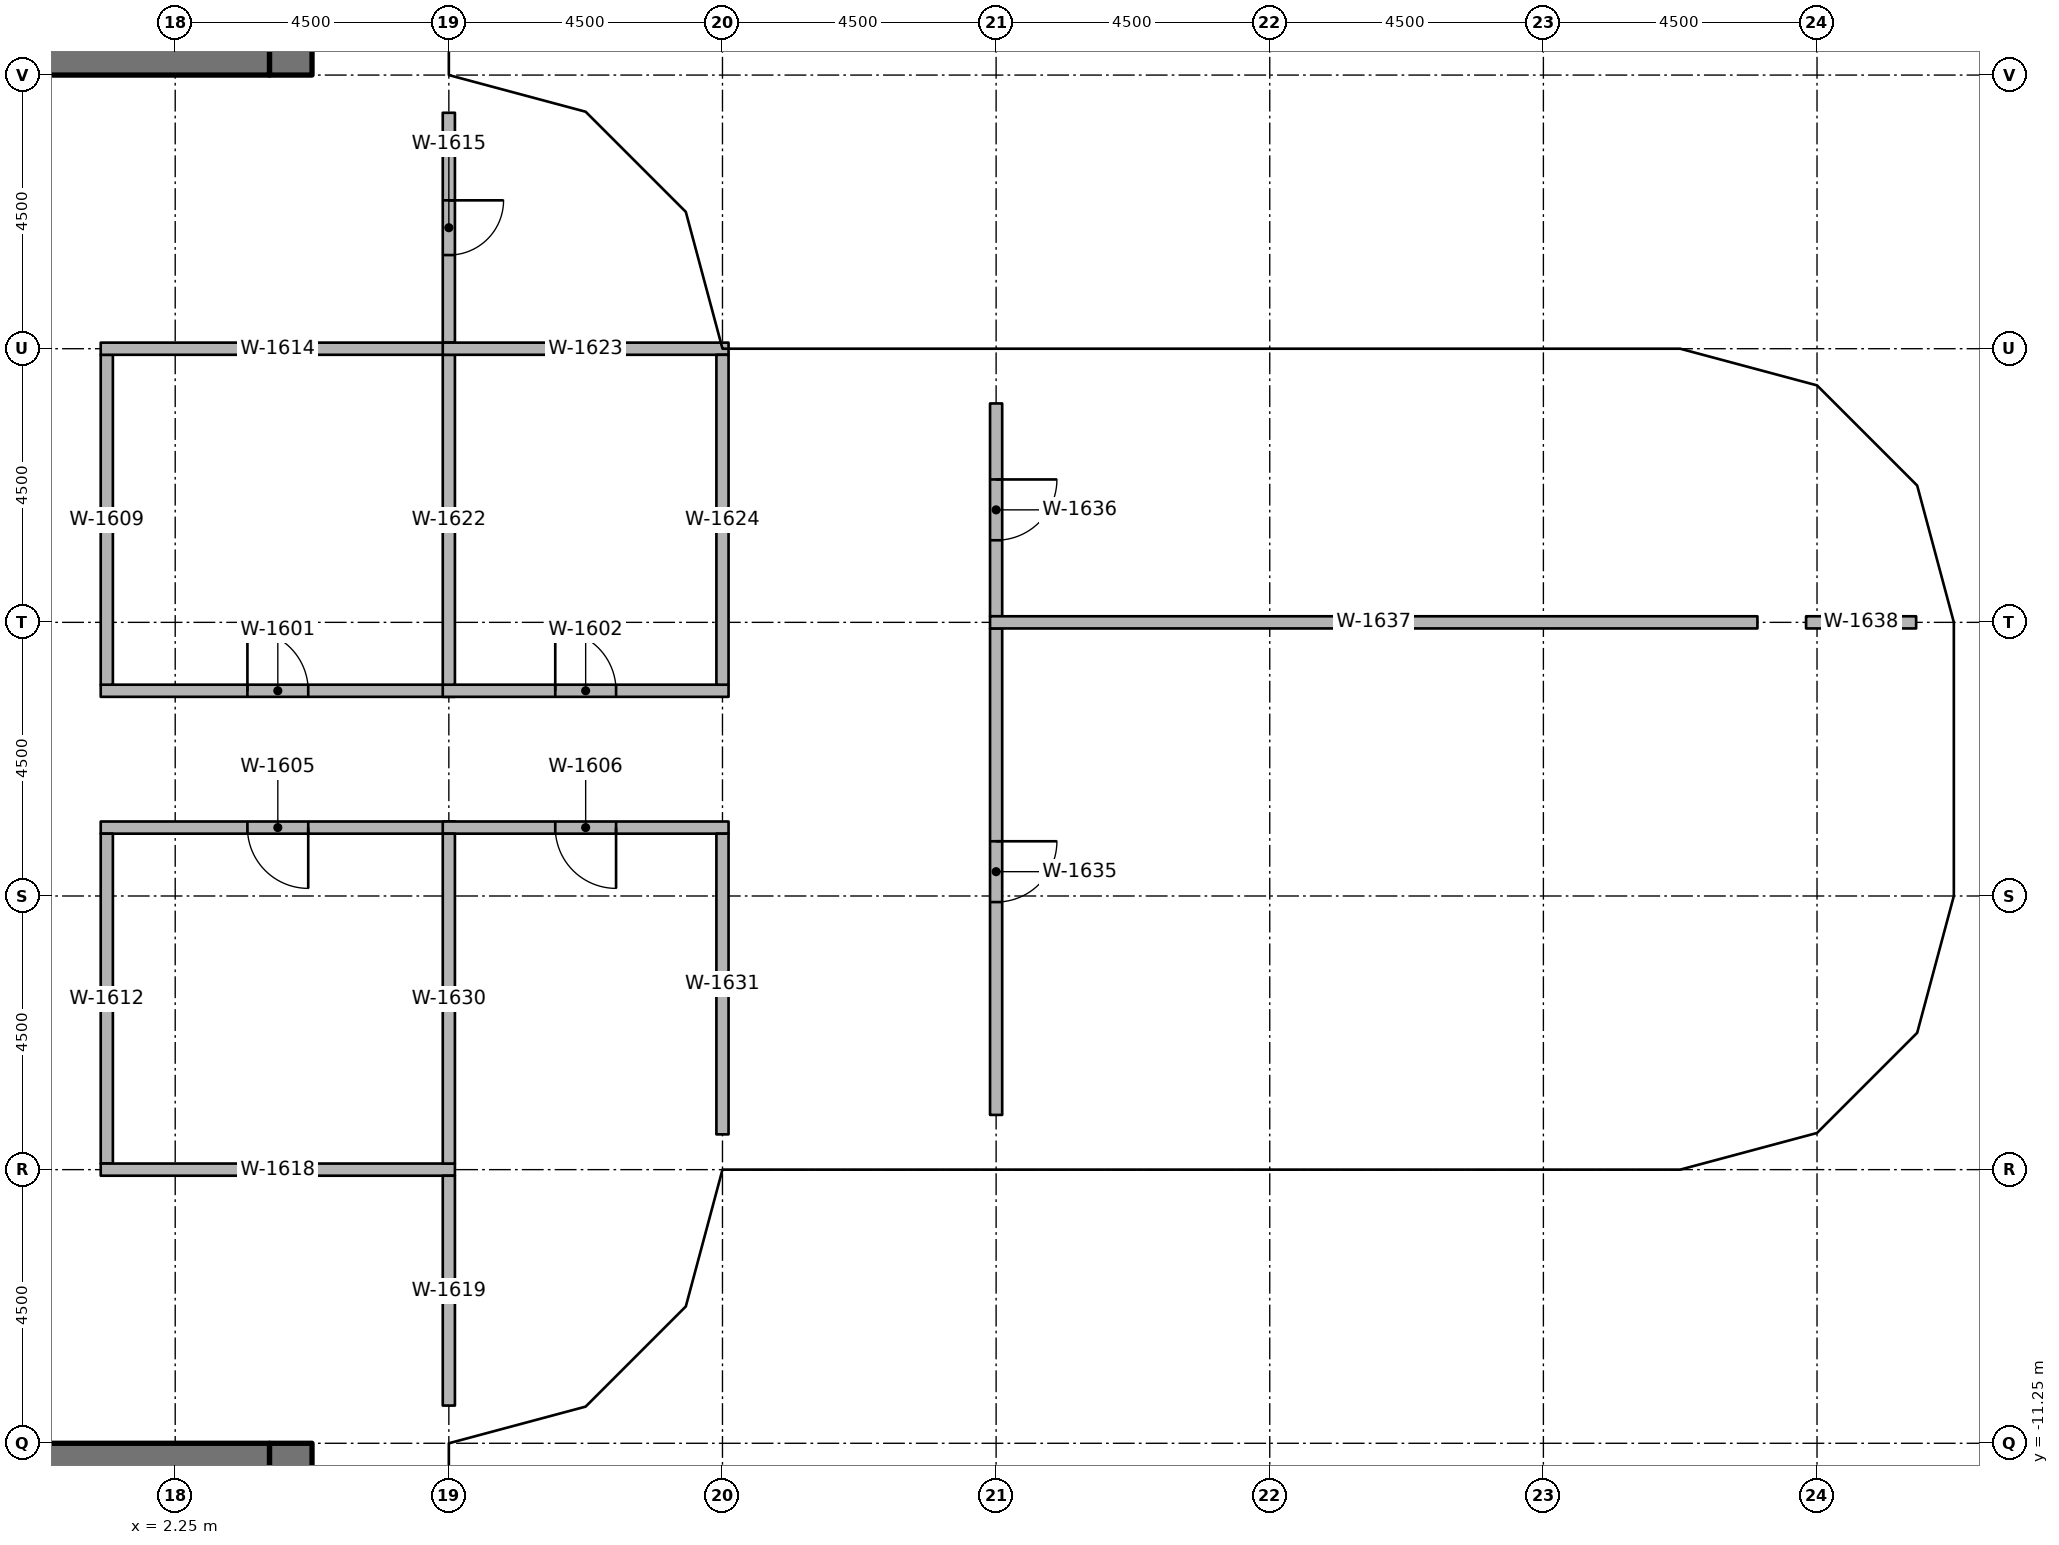
"""IFC4 building model, lengths in metres.
Left out: names, types, materials, properties, quantities, classifications, styles, units other than length and angle.
Written with IfcOpenShell. Run it as: python <this file> out.ifc"""

import sys

from ifc_helpers import new_model, si_unit, direction, frame, frame_2d, origin, origin_2d, place, context, subcontext, project, spatial, rectangle, extrude, element, fill, save


model = new_model("IFC4")
c1 = context("Model", 3, precision=1e-05, world=origin(), true_north=direction((0.0, 1.0)))
c2 = subcontext(c1, "Body", "Model", "MODEL_VIEW")
j1 = project(units=[si_unit("LENGTHUNIT", "METRE"), si_unit("PLANEANGLEUNIT", "RADIAN")], contexts=[c1])
p1 = place(None, origin())
s1 = spatial("IfcSite", under=j1, at=p1, CompositionType="ELEMENT")
p2 = place(p1, origin())
s2 = spatial("IfcBuilding", under=s1, at=p2, CompositionType="ELEMENT")
p3 = place(p2, frame((0.0, 0.0, 156.2)))
s3 = spatial("IfcBuildingStorey", under=s2, at=p3, CompositionType="ELEMENT", Elevation=156.2)
for number, where, z_axis, x_axis in (
    (1, (6.25, -10.75, 0.0), (0.0, 0.0, 1.0), (1.0, 0.0, 0.0)),
    (2, (6.25, -6.25, 0.0), (0.0, 0.0, 1.0), (1.0, 0.0, 0.0)),
    (3, (6.25, 6.25, 0.0), (0.0, 0.0, 1.0), (1.0, 0.0, 0.0)),
    (4, (6.25, 10.75, 0.0), (0.0, 0.0, 1.0), (1.0, 0.0, 0.0)),
    (5, (10.75, -6.25, 0.0), (0.0, 0.0, 1.0), (1.0, 0.0, 0.0)),
    (6, (10.75, 6.25, 0.0), (0.0, 0.0, 1.0), (1.0, 0.0, 0.0)),
    (7, (15.75, -6.25, 0.0), (0.0, 0.0, 1.0), (1.0, 0.0, 0.0)),
    (8, (15.75, 6.25, 0.0), (0.0, 0.0, 1.0), (1.0, 0.0, 0.0)),
    (9, (20.25, -6.11, 0.0), (0.0, 0.0, 1.0), (1.0, 0.0, 0.0)),
    (10, (20.25, 6.11, 0.0), (0.0, 0.0, 1.0), (1.0, 0.0, 0.0)),
    (11, (24.75, -6.11, 0.0), (0.0, 0.0, 1.0), (1.0, 0.0, 0.0)),
    (12, (24.75, 6.11, 0.0), (0.0, 0.0, 1.0), (1.0, 0.0, 0.0)),
    (13, (28.908, -5.475, 0.0), (0.0, 0.0, 1.0), (1.0, 0.0, 0.0)),
    (14, (28.67, -2.25, 0.0), (0.0, 0.0, 1.0), (1.0, 0.0, 0.0)),
    (15, (28.67, 2.25, 0.0), (0.0, 0.0, 1.0), (1.0, 0.0, 0.0)),
    (16, (28.908, 5.475, 0.0), (0.0, 0.0, 1.0), (1.0, 0.0, 0.0)),
):
    element("IfcColumn", number, at=place(p3, frame(where, z_axis=z_axis, x_axis=x_axis)), inside=s3, PredefinedType="COLUMN", context=c2, shape_type="SweptSolid", body=[
        extrude(rectangle(XDim=0.8, YDim=0.8, at=origin_2d()), origin(), (0.0, 0.0, 1.0), 3.65),
    ])
p4 = place(p3, frame((4.15, 11.25, 0.0), z_axis=(0.0, 0.0, 1.0), x_axis=(0.0, 1.0, 0.0)))
e17 = element("IfcWall", 17, at=p4, inside=s3, PredefinedType="SHEAR", context=c2, shape_type="SweptSolid", body=[
    extrude(rectangle(XDim=15.0, YDim=0.7, at=frame_2d((7.5, 0.0))), origin(), (0.0, 0.0, 1.0), 3.8),
])
p5 = place(p4, frame((7.15, 0.0, 0.0)))
e18 = element("IfcOpeningElement", 18, at=p5, cuts=e17, PredefinedType="OPENING", context=c2, shape_type="SweptSolid", body=[
    extrude(rectangle(XDim=1.5, YDim=2.3, at=frame_2d((0.75, 1.15))), frame((0.0, 0.36, 0.0), z_axis=(0.0, -1.0, 0.0), x_axis=(1.0, 0.0, 0.0)), (0.0, 0.0, 1.0), 0.72),
])
p6 = place(p4, frame((5.55, 0.0, 0.0)))
e19 = element("IfcOpeningElement", 19, at=p6, cuts=e17, PredefinedType="OPENING", context=c2, shape_type="SweptSolid", body=[
    extrude(rectangle(XDim=1.2, YDim=2.1, at=frame_2d((0.6, 1.05))), frame((0.0, 0.36, 0.0), z_axis=(0.0, -1.0, 0.0), x_axis=(1.0, 0.0, 0.0)), (0.0, 0.0, 1.0), 0.72),
])
p7 = place(p3, frame((-3.8, 11.6, 0.0), z_axis=(0.0, 0.0, 1.0), x_axis=(1.0, 0.0, 0.0)))
e20 = element("IfcWall", 20, at=p7, inside=s3, PredefinedType="SHEAR", context=c2, shape_type="SweptSolid", body=[
    extrude(rectangle(XDim=7.6, YDim=0.7, at=frame_2d((3.8, 0.0))), origin(), (0.0, 0.0, 1.0), 3.8),
])
p8 = place(p3, frame((4.15, -11.25, 0.0), z_axis=(0.0, 0.0, 1.0), x_axis=(0.0, -1.0, 0.0)))
e21 = element("IfcWall", 21, at=p8, inside=s3, PredefinedType="SHEAR", context=c2, shape_type="SweptSolid", body=[
    extrude(rectangle(XDim=15.0, YDim=0.7, at=frame_2d((7.5, 0.0))), origin(), (0.0, 0.0, 1.0), 3.8),
])
p9 = place(p8, frame((7.15, 0.0, 0.0)))
e22 = element("IfcOpeningElement", 22, at=p9, cuts=e21, PredefinedType="OPENING", context=c2, shape_type="SweptSolid", body=[
    extrude(rectangle(XDim=1.5, YDim=2.3, at=frame_2d((0.75, 1.15))), frame((0.0, 0.36, 0.0), z_axis=(0.0, -1.0, 0.0), x_axis=(1.0, 0.0, 0.0)), (0.0, 0.0, 1.0), 0.72),
])
p10 = place(p8, frame((13.9, 0.0, 0.0)))
e23 = element("IfcOpeningElement", 23, at=p10, cuts=e21, PredefinedType="OPENING", context=c2, shape_type="SweptSolid", body=[
    extrude(rectangle(XDim=0.9, YDim=2.1, at=frame_2d((0.45, 1.05))), frame((0.0, 0.36, 0.0), z_axis=(0.0, -1.0, 0.0), x_axis=(1.0, 0.0, 0.0)), (0.0, 0.0, 1.0), 0.72),
])
p11 = place(p8, frame((1.15, 0.0, 0.0)))
e24 = element("IfcOpeningElement", 24, at=p11, cuts=e21, PredefinedType="OPENING", context=c2, shape_type="SweptSolid", body=[
    extrude(rectangle(XDim=1.2, YDim=2.1, at=frame_2d((0.6, 1.05))), frame((0.0, 0.36, 0.0), z_axis=(0.0, -1.0, 0.0), x_axis=(1.0, 0.0, 0.0)), (0.0, 0.0, 1.0), 0.72),
])
p12 = place(p3, frame((-3.8, -11.6, 0.0), z_axis=(0.0, 0.0, 1.0), x_axis=(1.0, 0.0, 0.0)))
e25 = element("IfcWall", 25, at=p12, inside=s3, PredefinedType="SHEAR", context=c2, shape_type="SweptSolid", body=[
    extrude(rectangle(XDim=7.6, YDim=0.7, at=frame_2d((3.8, 0.0))), origin(), (0.0, 0.0, 1.0), 3.8),
])
p13 = place(p3, frame((1.025, 1.125, 0.0), z_axis=(0.0, 0.0, 1.0), x_axis=(1.0, 0.0, 0.0)))
e26 = element("IfcWall", 26, at=p13, inside=s3, PredefinedType="PARTITIONING", context=c2, shape_type="SweptSolid", body=[
    extrude(rectangle(XDim=5.825, YDim=0.2, at=frame_2d((2.913, 0.0))), origin(), (0.0, 0.0, 1.0), 2.75),
])
p14 = place(p13, frame((2.413, 0.0, 0.0)))
e27 = element("IfcOpeningElement", 27, at=p14, cuts=e26, PredefinedType="OPENING", context=c2, shape_type="SweptSolid", body=[
    extrude(rectangle(XDim=1.0, YDim=2.1, at=frame_2d((0.5, 1.05))), frame((0.0, 0.11, 0.0), z_axis=(0.0, -1.0, 0.0), x_axis=(1.0, 0.0, 0.0)), (0.0, 0.0, 1.0), 0.22),
])
p15 = place(p3, frame((6.65, 1.125, 0.0), z_axis=(0.0, 0.0, 1.0), x_axis=(1.0, 0.0, 0.0)))
e28 = element("IfcWall", 28, at=p15, inside=s3, PredefinedType="PARTITIONING", context=c2, shape_type="SweptSolid", body=[
    extrude(rectangle(XDim=4.7, YDim=0.2, at=frame_2d((2.35, 0.0))), origin(), (0.0, 0.0, 1.0), 2.75),
])
p16 = place(p15, frame((1.85, 0.0, 0.0)))
e29 = element("IfcOpeningElement", 29, at=p16, cuts=e28, PredefinedType="OPENING", context=c2, shape_type="SweptSolid", body=[
    extrude(rectangle(XDim=1.0, YDim=2.1, at=frame_2d((0.5, 1.05))), frame((0.0, 0.11, 0.0), z_axis=(0.0, -1.0, 0.0), x_axis=(1.0, 0.0, 0.0)), (0.0, 0.0, 1.0), 0.22),
])
p17 = place(p3, frame((6.85, -1.125, 0.0), z_axis=(0.0, 0.0, 1.0), x_axis=(-1.0, 0.0, 0.0)))
e30 = element("IfcWall", 30, at=p17, inside=s3, PredefinedType="PARTITIONING", context=c2, shape_type="SweptSolid", body=[
    extrude(rectangle(XDim=5.825, YDim=0.2, at=frame_2d((2.913, 0.0))), origin(), (0.0, 0.0, 1.0), 2.75),
])
p18 = place(p17, frame((2.413, 0.0, 0.0)))
e31 = element("IfcOpeningElement", 31, at=p18, cuts=e30, PredefinedType="OPENING", context=c2, shape_type="SweptSolid", body=[
    extrude(rectangle(XDim=1.0, YDim=2.1, at=frame_2d((0.5, 1.05))), frame((0.0, 0.11, 0.0), z_axis=(0.0, -1.0, 0.0), x_axis=(1.0, 0.0, 0.0)), (0.0, 0.0, 1.0), 0.22),
])
p19 = place(p3, frame((11.35, -1.125, 0.0), z_axis=(0.0, 0.0, 1.0), x_axis=(-1.0, 0.0, 0.0)))
e32 = element("IfcWall", 32, at=p19, inside=s3, PredefinedType="PARTITIONING", context=c2, shape_type="SweptSolid", body=[
    extrude(rectangle(XDim=4.7, YDim=0.2, at=frame_2d((2.35, 0.0))), origin(), (0.0, 0.0, 1.0), 2.75),
])
p20 = place(p19, frame((1.85, 0.0, 0.0)))
e33 = element("IfcOpeningElement", 33, at=p20, cuts=e32, PredefinedType="OPENING", context=c2, shape_type="SweptSolid", body=[
    extrude(rectangle(XDim=1.0, YDim=2.1, at=frame_2d((0.5, 1.05))), frame((0.0, 0.11, 0.0), z_axis=(0.0, -1.0, 0.0), x_axis=(1.0, 0.0, 0.0)), (0.0, 0.0, 1.0), 0.22),
])
for number, where, z_axis, x_axis in (
    (34, (1.125, 1.225, 0.0), (0.0, 0.0, 1.0), (0.0, 1.0, 0.0)),
    (35, (1.125, -6.65, 0.0), (0.0, 0.0, 1.0), (0.0, 1.0, 0.0)),
):
    element("IfcWall", number, at=place(p3, frame(where, z_axis=z_axis, x_axis=x_axis)), inside=s3, PredefinedType="PARTITIONING", context=c2, shape_type="SweptSolid", body=[
        extrude(rectangle(XDim=5.425, YDim=0.2, at=frame_2d((2.712, 0.0))), origin(), (0.0, 0.0, 1.0), 2.75),
    ])
p21 = place(p3, frame((1.025, 6.75, 0.0), z_axis=(0.0, 0.0, 1.0), x_axis=(1.0, 0.0, 0.0)))
e36 = element("IfcWall", 36, at=p21, inside=s3, PredefinedType="PARTITIONING", context=c2, shape_type="SweptSolid", body=[
    extrude(rectangle(XDim=5.825, YDim=0.2, at=frame_2d((2.913, 0.0))), origin(), (0.0, 0.0, 1.0), 2.75),
])
p22 = place(p3, frame((6.75, 10.63, 0.0), z_axis=(0.0, 0.0, 1.0), x_axis=(0.0, -1.0, 0.0)))
e37 = element("IfcWall", 37, at=p22, inside=s3, PredefinedType="PARTITIONING", context=c2, shape_type="SweptSolid", body=[
    extrude(rectangle(XDim=3.78, YDim=0.2, at=frame_2d((1.89, 0.0))), origin(), (0.0, 0.0, 1.0), 2.75),
])
p23 = place(p22, frame((1.44, 0.0, 0.0)))
e38 = element("IfcOpeningElement", 38, at=p23, cuts=e37, PredefinedType="OPENING", context=c2, shape_type="SweptSolid", body=[
    extrude(rectangle(XDim=0.9, YDim=2.1, at=frame_2d((0.45, 1.05))), frame((0.0, 0.11, 0.0), z_axis=(0.0, -1.0, 0.0), x_axis=(1.0, 0.0, 0.0)), (0.0, 0.0, 1.0), 0.22),
])
p24 = place(p3, frame((1.025, -6.75, 0.0), z_axis=(0.0, 0.0, 1.0), x_axis=(1.0, 0.0, 0.0)))
e39 = element("IfcWall", 39, at=p24, inside=s3, PredefinedType="PARTITIONING", context=c2, shape_type="SweptSolid", body=[
    extrude(rectangle(XDim=5.825, YDim=0.2, at=frame_2d((2.913, 0.0))), origin(), (0.0, 0.0, 1.0), 2.75),
])
p25 = place(p3, frame((6.75, -10.63, 0.0), z_axis=(0.0, 0.0, 1.0), x_axis=(0.0, 1.0, 0.0)))
e40 = element("IfcWall", 40, at=p25, inside=s3, PredefinedType="PARTITIONING", context=c2, shape_type="SweptSolid", body=[
    extrude(rectangle(XDim=3.78, YDim=0.2, at=frame_2d((1.89, 0.0))), origin(), (0.0, 0.0, 1.0), 2.75),
])
p26 = place(p3, frame((6.75, 1.225, 0.0), z_axis=(0.0, 0.0, 1.0), x_axis=(0.0, 1.0, 0.0)))
e41 = element("IfcWall", 41, at=p26, inside=s3, PredefinedType="PARTITIONING", context=c2, shape_type="SweptSolid", body=[
    extrude(rectangle(XDim=5.425, YDim=0.2, at=frame_2d((2.712, 0.0))), origin(), (0.0, 0.0, 1.0), 2.75),
])
p27 = place(p3, frame((6.65, 6.75, 0.0), z_axis=(0.0, 0.0, 1.0), x_axis=(1.0, 0.0, 0.0)))
e42 = element("IfcWall", 42, at=p27, inside=s3, PredefinedType="PARTITIONING", context=c2, shape_type="SweptSolid", body=[
    extrude(rectangle(XDim=4.7, YDim=0.2, at=frame_2d((2.35, 0.0))), origin(), (0.0, 0.0, 1.0), 2.75),
])
for number, where, z_axis, x_axis in (
    (43, (11.25, 1.225, 0.0), (0.0, 0.0, 1.0), (0.0, 1.0, 0.0)),
    (44, (6.75, -6.65, 0.0), (0.0, 0.0, 1.0), (0.0, 1.0, 0.0)),
):
    element("IfcWall", number, at=place(p3, frame(where, z_axis=z_axis, x_axis=x_axis)), inside=s3, PredefinedType="PARTITIONING", context=c2, shape_type="SweptSolid", body=[
        extrude(rectangle(XDim=5.425, YDim=0.2, at=frame_2d((2.712, 0.0))), origin(), (0.0, 0.0, 1.0), 2.75),
    ])
p28 = place(p3, frame((11.25, -6.17, 0.0), z_axis=(0.0, 0.0, 1.0), x_axis=(0.0, 1.0, 0.0)))
e45 = element("IfcWall", 45, at=p28, inside=s3, PredefinedType="PARTITIONING", context=c2, shape_type="SweptSolid", body=[
    extrude(rectangle(XDim=4.945, YDim=0.2, at=frame_2d((2.472, 0.0))), origin(), (0.0, 0.0, 1.0), 2.75),
])
p29 = place(p3, frame((15.75, 2.15, 0.0), z_axis=(0.0, 0.0, 1.0), x_axis=(0.0, -1.0, 0.0)))
e46 = element("IfcWall", 46, at=p29, inside=s3, PredefinedType="PARTITIONING", context=c2, shape_type="SweptSolid", body=[
    extrude(rectangle(XDim=8.0, YDim=0.2, at=frame_2d((4.0, 0.0))), origin(), (0.0, 0.0, 1.0), 2.75),
])
p30 = place(p29, frame((3.5, 0.0, 0.0)))
e47 = element("IfcOpeningElement", 47, at=p30, cuts=e46, PredefinedType="OPENING", context=c2, shape_type="SweptSolid", body=[
    extrude(rectangle(XDim=1.0, YDim=2.1, at=frame_2d((0.5, 1.05))), frame((0.0, 0.11, 0.0), z_axis=(0.0, -1.0, 0.0), x_axis=(1.0, 0.0, 0.0)), (0.0, 0.0, 1.0), 0.22),
])
p31 = place(p3, frame((15.75, 5.85, 0.0), z_axis=(0.0, 0.0, 1.0), x_axis=(0.0, -1.0, 0.0)))
e48 = element("IfcWall", 48, at=p31, inside=s3, PredefinedType="PARTITIONING", context=c2, shape_type="SweptSolid", body=[
    extrude(rectangle(XDim=3.5, YDim=0.2, at=frame_2d((1.75, 0.0))), origin(), (0.0, 0.0, 1.0), 2.75),
])
p32 = place(p31, frame((1.25, 0.0, 0.0)))
e49 = element("IfcOpeningElement", 49, at=p32, cuts=e48, PredefinedType="OPENING", context=c2, shape_type="SweptSolid", body=[
    extrude(rectangle(XDim=1.0, YDim=2.1, at=frame_2d((0.5, 1.05))), frame((0.0, 0.11, 0.0), z_axis=(0.0, -1.0, 0.0), x_axis=(1.0, 0.0, 0.0)), (0.0, 0.0, 1.0), 0.22),
])
p33 = place(p3, frame((15.65, 2.25, 0.0), z_axis=(0.0, 0.0, 1.0), x_axis=(1.0, 0.0, 0.0)))
e50 = element("IfcWall", 50, at=p33, inside=s3, PredefinedType="PARTITIONING", context=c2, shape_type="SweptSolid", body=[
    extrude(rectangle(XDim=12.62, YDim=0.2, at=frame_2d((6.31, 0.0))), origin(), (0.0, 0.0, 1.0), 2.75),
])
p34 = place(p3, frame((29.07, 2.25, 0.0), z_axis=(0.0, 0.0, 1.0), x_axis=(1.0, 0.0, 0.0)))
e51 = element("IfcWall", 51, at=p34, inside=s3, PredefinedType="PARTITIONING", context=c2, shape_type="SweptSolid", body=[
    extrude(rectangle(XDim=1.81, YDim=0.2, at=frame_2d((0.905, 0.0))), origin(), (0.0, 0.0, 1.0), 2.75),
])
p35 = place(p30, origin())
e52 = element("IfcDoor", 52, at=p35, inside=s3, OperationType="SINGLE_SWING_RIGHT", PredefinedType="DOOR", context=c2, shape_type="SweptSolid", body=[
    extrude(rectangle(XDim=1.0, YDim=2.1, at=frame_2d((0.5, 1.05))), frame((0.0, 0.025, 0.0), z_axis=(0.0, -1.0, 0.0), x_axis=(1.0, 0.0, 0.0)), (0.0, 0.0, 1.0), 0.05),
])
fill(e47, e52)
p36 = place(p32, origin())
e53 = element("IfcDoor", 53, at=p36, inside=s3, OperationType="SINGLE_SWING_RIGHT", PredefinedType="DOOR", context=c2, shape_type="SweptSolid", body=[
    extrude(rectangle(XDim=1.0, YDim=2.1, at=frame_2d((0.5, 1.05))), frame((0.0, 0.025, 0.0), z_axis=(0.0, -1.0, 0.0), x_axis=(1.0, 0.0, 0.0)), (0.0, 0.0, 1.0), 0.05),
])
fill(e49, e53)
p37 = place(p14, origin())
e54 = element("IfcDoor", 54, at=p37, inside=s3, OperationType="SINGLE_SWING_RIGHT", PredefinedType="DOOR", context=c2, shape_type="SweptSolid", body=[
    extrude(rectangle(XDim=1.0, YDim=2.1, at=frame_2d((0.5, 1.05))), frame((0.0, 0.025, 0.0), z_axis=(0.0, -1.0, 0.0), x_axis=(1.0, 0.0, 0.0)), (0.0, 0.0, 1.0), 0.05),
])
fill(e27, e54)
p38 = place(p16, origin())
e55 = element("IfcDoor", 55, at=p38, inside=s3, OperationType="SINGLE_SWING_RIGHT", PredefinedType="DOOR", context=c2, shape_type="SweptSolid", body=[
    extrude(rectangle(XDim=1.0, YDim=2.1, at=frame_2d((0.5, 1.05))), frame((0.0, 0.025, 0.0), z_axis=(0.0, -1.0, 0.0), x_axis=(1.0, 0.0, 0.0)), (0.0, 0.0, 1.0), 0.05),
])
fill(e29, e55)
p39 = place(p23, origin())
e56 = element("IfcDoor", 56, at=p39, inside=s3, OperationType="SINGLE_SWING_RIGHT", PredefinedType="DOOR", context=c2, shape_type="SweptSolid", body=[
    extrude(rectangle(XDim=0.9, YDim=2.1, at=frame_2d((0.45, 1.05))), frame((0.0, 0.025, 0.0), z_axis=(0.0, -1.0, 0.0), x_axis=(1.0, 0.0, 0.0)), (0.0, 0.0, 1.0), 0.05),
])
fill(e38, e56)
p40 = place(p18, origin())
e57 = element("IfcDoor", 57, at=p40, inside=s3, OperationType="SINGLE_SWING_RIGHT", PredefinedType="DOOR", context=c2, shape_type="SweptSolid", body=[
    extrude(rectangle(XDim=1.0, YDim=2.1, at=frame_2d((0.5, 1.05))), frame((0.0, 0.025, 0.0), z_axis=(0.0, -1.0, 0.0), x_axis=(1.0, 0.0, 0.0)), (0.0, 0.0, 1.0), 0.05),
])
fill(e31, e57)
p41 = place(p20, origin())
e58 = element("IfcDoor", 58, at=p41, inside=s3, OperationType="SINGLE_SWING_RIGHT", PredefinedType="DOOR", context=c2, shape_type="SweptSolid", body=[
    extrude(rectangle(XDim=1.0, YDim=2.1, at=frame_2d((0.5, 1.05))), frame((0.0, 0.025, 0.0), z_axis=(0.0, -1.0, 0.0), x_axis=(1.0, 0.0, 0.0)), (0.0, 0.0, 1.0), 0.05),
])
fill(e33, e58)
save(model, sys.argv[1])
